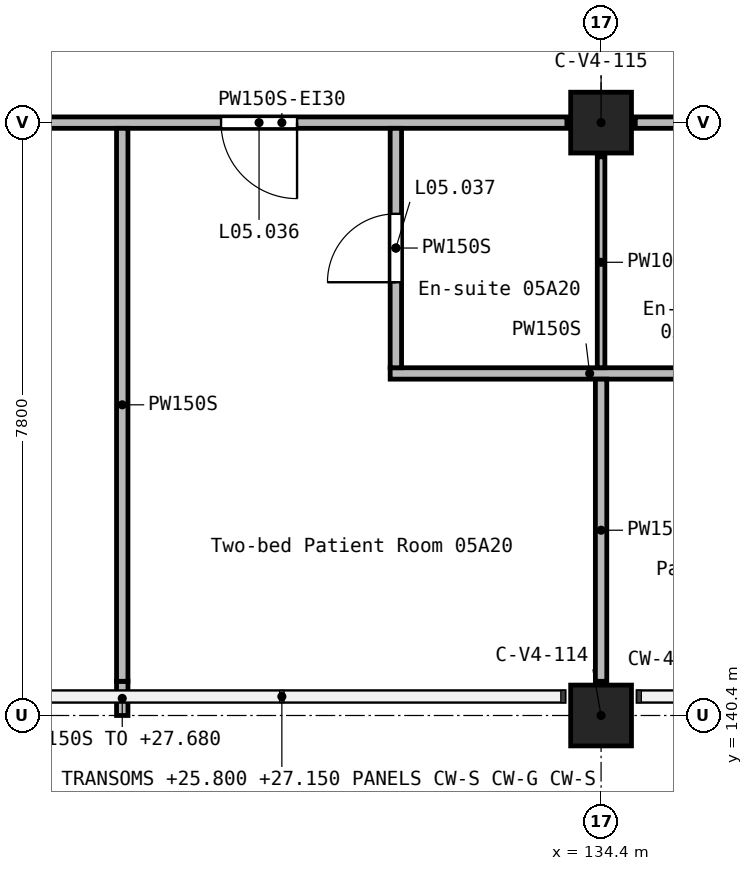
"""IFC4 building model, lengths in metres.
Left out: names, types, materials, properties, quantities, classifications, styles, units other than length and angle.
Written with IfcOpenShell. Run it as: python <this file> out.ifc"""

import sys

from ifc_helpers import new_model, si_unit, direction, frame, frame_2d, origin, origin_2d, place, context, subcontext, project, spatial, rectangle, extrude, element, fill, save


model = new_model("IFC4")
c1 = context("Model", 3, precision=1e-05, world=origin(), true_north=direction((0.0, 1.0)))
c2 = subcontext(c1, "Body", "Model", "MODEL_VIEW")
j1 = project(units=[si_unit("LENGTHUNIT", "METRE"), si_unit("PLANEANGLEUNIT", "RADIAN")], contexts=[c1])
p1 = place(None, origin())
s1 = spatial("IfcSite", under=j1, at=p1, CompositionType="ELEMENT")
p2 = place(p1, origin())
s2 = spatial("IfcBuilding", under=s1, at=p2, CompositionType="ELEMENT")
p3 = place(p2, frame((0.0, 0.0, 24.9)))
s3 = spatial("IfcBuildingStorey", under=s2, at=p3, CompositionType="ELEMENT", Elevation=24.9)
for number, where, z_axis, x_axis in (
    (1, (134.4, 140.4, 0.0), (0.0, 0.0, 1.0), (1.0, 0.0, 0.0)),
    (2, (134.4, 148.2, 0.0), (0.0, 0.0, 1.0), (1.0, 0.0, 0.0)),
):
    element("IfcColumn", number, at=place(p3, frame(where, z_axis=z_axis, x_axis=x_axis)), inside=s3, PredefinedType="COLUMN", context=c2, shape_type="SweptSolid", body=[
        extrude(rectangle(XDim=0.8, YDim=0.8, at=origin_2d()), origin(), (0.0, 0.0, 1.0), 3.9),
    ])
p4 = place(p3, frame((138.675, 148.2, 0.0), z_axis=(0.0, 0.0, 1.0), x_axis=(-1.0, 0.0, 0.0)))
e3 = element("IfcWall", 3, at=p4, inside=s3, PredefinedType="PARTITIONING", context=c2, shape_type="SweptSolid", body=[
    extrude(rectangle(XDim=3.825, YDim=0.15, at=frame_2d((1.913, 0.0))), origin(), (0.0, 0.0, 1.0), 3.6),
])
p5 = place(p4, frame((0.475, 0.0, 0.0)))
e4 = element("IfcOpeningElement", 4, at=p5, cuts=e3, PredefinedType="OPENING", context=c2, shape_type="SweptSolid", body=[
    extrude(rectangle(XDim=1.0, YDim=2.1, at=frame_2d((0.5, 1.05))), frame((0.0, 0.085, 0.0), z_axis=(0.0, -1.0, 0.0), x_axis=(1.0, 0.0, 0.0)), (0.0, 0.0, 1.0), 0.17),
])
p6 = place(p3, frame((133.95, 148.2, 0.0), z_axis=(0.0, 0.0, 1.0), x_axis=(-1.0, 0.0, 0.0)))
e5 = element("IfcWall", 5, at=p6, inside=s3, PredefinedType="PARTITIONING", context=c2, shape_type="SweptSolid", body=[
    extrude(rectangle(XDim=7.5, YDim=0.15, at=frame_2d((3.75, 0.0))), origin(), (0.0, 0.0, 1.0), 3.6),
])
p7 = place(p6, frame((3.55, 0.0, 0.0)))
e6 = element("IfcOpeningElement", 6, at=p7, cuts=e5, PredefinedType="OPENING", context=c2, shape_type="SweptSolid", body=[
    extrude(rectangle(XDim=1.0, YDim=2.1, at=frame_2d((0.5, 1.05))), frame((0.0, 0.085, 0.0), z_axis=(0.0, -1.0, 0.0), x_axis=(1.0, 0.0, 0.0)), (0.0, 0.0, 1.0), 0.17),
])
p8 = place(p3, frame((128.1, 140.4, 0.0), z_axis=(0.0, 0.0, 1.0), x_axis=(0.0, 1.0, 0.0)))
e7 = element("IfcWall", 7, at=p8, inside=s3, PredefinedType="PARTITIONING", context=c2, shape_type="SweptSolid", body=[
    extrude(rectangle(XDim=0.45, YDim=0.15, at=frame_2d((0.225, 0.0))), origin(), (0.0, 0.0, 1.0), 2.78),
])
p9 = place(p3, frame((128.1, 140.85, 0.0), z_axis=(0.0, 0.0, 1.0), x_axis=(0.0, 1.0, 0.0)))
e8 = element("IfcWall", 8, at=p9, inside=s3, PredefinedType="PARTITIONING", context=c2, shape_type="SweptSolid", body=[
    extrude(rectangle(XDim=7.275, YDim=0.15, at=frame_2d((3.637, 0.0))), origin(), (0.0, 0.0, 1.0), 3.6),
])
p10 = place(p3, frame((131.625, 144.9, 0.0), z_axis=(0.0, 0.0, 1.0), x_axis=(1.0, 0.0, 0.0)))
e9 = element("IfcWall", 9, at=p10, inside=s3, PredefinedType="PARTITIONING", context=c2, shape_type="SweptSolid", body=[
    extrude(rectangle(XDim=5.25, YDim=0.15, at=frame_2d((2.625, 0.0))), origin(), (0.0, 0.0, 1.0), 3.6),
])
p11 = place(p3, frame((134.4, 140.85, 0.0), z_axis=(0.0, 0.0, 1.0), x_axis=(0.0, 1.0, 0.0)))
e10 = element("IfcWall", 10, at=p11, inside=s3, PredefinedType="PARTITIONING", context=c2, shape_type="SweptSolid", body=[
    extrude(rectangle(XDim=3.975, YDim=0.15, at=frame_2d((1.987, 0.0))), origin(), (0.0, 0.0, 1.0), 3.6),
])
p12 = place(p3, frame((131.7, 144.975, 0.0), z_axis=(0.0, 0.0, 1.0), x_axis=(0.0, 1.0, 0.0)))
e11 = element("IfcWall", 11, at=p12, inside=s3, PredefinedType="PARTITIONING", context=c2, shape_type="SweptSolid", body=[
    extrude(rectangle(XDim=3.15, YDim=0.15, at=frame_2d((1.575, 0.0))), origin(), (0.0, 0.0, 1.0), 3.6),
])
p13 = place(p12, frame((1.125, 0.0, 0.0)))
e12 = element("IfcOpeningElement", 12, at=p13, cuts=e11, PredefinedType="OPENING", context=c2, shape_type="SweptSolid", body=[
    extrude(rectangle(XDim=0.9, YDim=2.1, at=frame_2d((0.45, 1.05))), frame((0.0, 0.085, 0.0), z_axis=(0.0, -1.0, 0.0), x_axis=(1.0, 0.0, 0.0)), (0.0, 0.0, 1.0), 0.17),
])
p14 = place(p3, frame((134.4, 144.975, 0.0), z_axis=(0.0, 0.0, 1.0), x_axis=(0.0, 1.0, 0.0)))
e13 = element("IfcWall", 13, at=p14, inside=s3, PredefinedType="PARTITIONING", context=c2, shape_type="SweptSolid", body=[
    extrude(rectangle(XDim=2.775, YDim=0.1, at=frame_2d((1.387, 0.0))), origin(), (0.0, 0.0, 1.0), 3.6),
])
p15 = place(p7, origin())
e14 = element("IfcDoor", 14, at=p15, inside=s3, OperationType="SINGLE_SWING_RIGHT", PredefinedType="DOOR", context=c2, shape_type="SweptSolid", body=[
    extrude(rectangle(XDim=1.0, YDim=2.1, at=frame_2d((0.5, 1.05))), frame((0.0, 0.025, 0.0), z_axis=(0.0, -1.0, 0.0), x_axis=(1.0, 0.0, 0.0)), (0.0, 0.0, 1.0), 0.05),
])
fill(e6, e14)
p16 = place(p13, frame((0.9, 0.0, 0.0), z_axis=(0.0, 0.0, 1.0), x_axis=(-1.0, 0.0, 0.0)))
e15 = element("IfcDoor", 15, at=p16, inside=s3, OperationType="SINGLE_SWING_LEFT", PredefinedType="DOOR", context=c2, shape_type="SweptSolid", body=[
    extrude(rectangle(XDim=0.9, YDim=2.1, at=frame_2d((0.45, 1.05))), frame((0.0, 0.025, 0.0), z_axis=(0.0, -1.0, 0.0), x_axis=(1.0, 0.0, 0.0)), (0.0, 0.0, 1.0), 0.05),
])
fill(e12, e15)
save(model, sys.argv[1])
